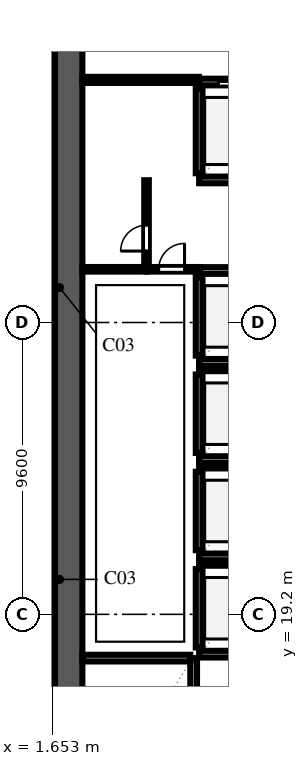
"""IFC4 building model, lengths in metres.
Left out: names, types, materials, properties, quantities, classifications, styles, units other than length and angle.
Written with IfcOpenShell. Run it as: python <this file> out.ifc"""

import sys

from ifc_helpers import new_model, si_unit, direction, frame, frame_2d, origin, place, context, subcontext, project, spatial, rectangle, extrude, element, fill, save


model = new_model("IFC4")
c1 = context("Model", 3, precision=1e-05, world=origin(), true_north=direction((0.0, 1.0)))
c2 = subcontext(c1, "Body", "Model", "MODEL_VIEW")
j1 = project(units=[si_unit("LENGTHUNIT", "METRE"), si_unit("PLANEANGLEUNIT", "RADIAN")], contexts=[c1])
p1 = place(None, origin())
s1 = spatial("IfcSite", under=j1, at=p1, CompositionType="ELEMENT")
p2 = place(p1, origin())
s2 = spatial("IfcBuilding", under=s1, at=p2, CompositionType="ELEMENT")
p3 = place(p2, frame((0.0, 0.0, 81.2)))
s3 = spatial("IfcBuildingStorey", under=s2, at=p3, CompositionType="ELEMENT", Elevation=81.2)
p4 = place(p3, frame((2.2, 9.15, 0.0), z_axis=(0.0, 0.0, 1.0), x_axis=(0.0, 1.0, 0.0)))
e1 = element("IfcWall", 1, at=p4, inside=s3, PredefinedType="SHEAR", context=c2, shape_type="SweptSolid", body=[
    extrude(rectangle(XDim=39.3, YDim=0.9, at=frame_2d((19.65, 0.0))), origin(), (0.0, 0.0, 1.0), 3.54),
])
p5 = place(p3, frame((6.31, 9.95, 0.0), z_axis=(0.0, 0.0, 1.0), x_axis=(0.0, 1.0, 0.0)))
e2 = element("IfcWall", 2, at=p5, inside=s3, PredefinedType="SOLIDWALL", context=c2, shape_type="SweptSolid", body=[
    extrude(rectangle(XDim=7.81, YDim=0.22, at=frame_2d((3.905, 0.0))), origin(), (0.0, 0.0, 1.0), 3.54),
])
p6 = place(p5, frame((0.14, 0.0, 0.0)))
e3 = element("IfcOpeningElement", 3, at=p6, cuts=e2, PredefinedType="OPENING", context=c2, shape_type="SweptSolid", body=[
    extrude(rectangle(XDim=1.1, YDim=2.2, at=frame_2d((0.55, 1.1))), frame((0.0, 0.122, 0.0), z_axis=(0.0, -1.0, 0.0), x_axis=(1.0, 0.0, 0.0)), (0.0, 0.0, 1.0), 0.244),
])
p7 = place(p3, frame((2.65, 17.76, 0.0), z_axis=(0.0, 0.0, 1.0), x_axis=(1.0, 0.0, 0.0)))
e4 = element("IfcWall", 4, at=p7, inside=s3, PredefinedType="SOLIDWALL", context=c2, shape_type="SweptSolid", body=[
    extrude(rectangle(XDim=3.55, YDim=0.22, at=frame_2d((1.775, 0.0))), origin(), (0.0, 0.0, 1.0), 3.54),
])
p8 = place(p3, frame((6.49, 18.11, 0.0), z_axis=(0.0, 0.0, 1.0), x_axis=(0.0, 1.0, 0.0)))
e5 = element("IfcWall", 5, at=p8, inside=s3, PredefinedType="SOLIDWALL", context=c2, shape_type="SweptSolid", body=[
    extrude(rectangle(XDim=2.58, YDim=0.22, at=frame_2d((1.29, 0.0))), origin(), (0.0, 0.0, 1.0), 3.54),
])
for number, where, z_axis, x_axis in (
    (6, (6.49, 17.89, 0.0), (0.0, 0.0, 1.0), (1.0, 0.0, 0.0)),
    (7, (6.49, 20.91, 0.0), (0.0, 0.0, 1.0), (1.0, 0.0, 0.0)),
):
    element("IfcWall", number, at=place(p3, frame(where, z_axis=z_axis, x_axis=x_axis)), inside=s3, PredefinedType="SOLIDWALL", context=c2, shape_type="SweptSolid", body=[
        extrude(rectangle(XDim=2.47, YDim=0.22, at=frame_2d((1.235, 0.0))), origin(), (0.0, 0.0, 1.0), 3.54),
    ])
p9 = place(p3, frame((6.49, 21.31, 0.0), z_axis=(0.0, 0.0, 1.0), x_axis=(0.0, 1.0, 0.0)))
e8 = element("IfcWall", 8, at=p9, inside=s3, PredefinedType="SOLIDWALL", context=c2, shape_type="SweptSolid", body=[
    extrude(rectangle(XDim=2.58, YDim=0.22, at=frame_2d((1.29, 0.0))), origin(), (0.0, 0.0, 1.0), 3.54),
])
for number, where, z_axis, x_axis in (
    (9, (6.49, 21.09, 0.0), (0.0, 0.0, 1.0), (1.0, 0.0, 0.0)),
    (10, (6.49, 24.11, 0.0), (0.0, 0.0, 1.0), (1.0, 0.0, 0.0)),
):
    element("IfcWall", number, at=place(p3, frame(where, z_axis=z_axis, x_axis=x_axis)), inside=s3, PredefinedType="SOLIDWALL", context=c2, shape_type="SweptSolid", body=[
        extrude(rectangle(XDim=2.47, YDim=0.22, at=frame_2d((1.235, 0.0))), origin(), (0.0, 0.0, 1.0), 3.54),
    ])
p10 = place(p3, frame((6.49, 24.51, 0.0), z_axis=(0.0, 0.0, 1.0), x_axis=(0.0, 1.0, 0.0)))
e11 = element("IfcWall", 11, at=p10, inside=s3, PredefinedType="SOLIDWALL", context=c2, shape_type="SweptSolid", body=[
    extrude(rectangle(XDim=2.58, YDim=0.22, at=frame_2d((1.29, 0.0))), origin(), (0.0, 0.0, 1.0), 3.54),
])
for number, where, z_axis, x_axis in (
    (12, (6.49, 24.29, 0.0), (0.0, 0.0, 1.0), (1.0, 0.0, 0.0)),
    (13, (6.49, 27.31, 0.0), (0.0, 0.0, 1.0), (1.0, 0.0, 0.0)),
):
    element("IfcWall", number, at=place(p3, frame(where, z_axis=z_axis, x_axis=x_axis)), inside=s3, PredefinedType="SOLIDWALL", context=c2, shape_type="SweptSolid", body=[
        extrude(rectangle(XDim=2.47, YDim=0.22, at=frame_2d((1.235, 0.0))), origin(), (0.0, 0.0, 1.0), 3.54),
    ])
p11 = place(p3, frame((6.49, 27.71, 0.0), z_axis=(0.0, 0.0, 1.0), x_axis=(0.0, 1.0, 0.0)))
e14 = element("IfcWall", 14, at=p11, inside=s3, PredefinedType="SOLIDWALL", context=c2, shape_type="SweptSolid", body=[
    extrude(rectangle(XDim=2.58, YDim=0.22, at=frame_2d((1.29, 0.0))), origin(), (0.0, 0.0, 1.0), 3.54),
])
for number, where, z_axis, x_axis in (
    (15, (6.49, 27.49, 0.0), (0.0, 0.0, 1.0), (1.0, 0.0, 0.0)),
    (16, (6.49, 30.51, 0.0), (0.0, 0.0, 1.0), (1.0, 0.0, 0.0)),
):
    element("IfcWall", number, at=place(p3, frame(where, z_axis=z_axis, x_axis=x_axis)), inside=s3, PredefinedType="SOLIDWALL", context=c2, shape_type="SweptSolid", body=[
        extrude(rectangle(XDim=2.47, YDim=0.22, at=frame_2d((1.235, 0.0))), origin(), (0.0, 0.0, 1.0), 3.54),
    ])
p12 = place(p3, frame((6.49, 33.71, 0.0), z_axis=(0.0, 0.0, 1.0), x_axis=(0.0, 1.0, 0.0)))
e17 = element("IfcWall", 17, at=p12, inside=s3, PredefinedType="SOLIDWALL", context=c2, shape_type="SweptSolid", body=[
    extrude(rectangle(XDim=2.78, YDim=0.22, at=frame_2d((1.39, 0.0))), origin(), (0.0, 0.0, 1.0), 3.54),
])
p13 = place(p3, frame((6.49, 33.49, 0.0), z_axis=(0.0, 0.0, 1.0), x_axis=(1.0, 0.0, 0.0)))
e18 = element("IfcWall", 18, at=p13, inside=s3, PredefinedType="SOLIDWALL", context=c2, shape_type="SweptSolid", body=[
    extrude(rectangle(XDim=2.47, YDim=0.22, at=frame_2d((1.235, 0.0))), origin(), (0.0, 0.0, 1.0), 3.54),
])
p14 = place(p3, frame((6.49, 36.71, 0.0), z_axis=(0.0, 0.0, 1.0), x_axis=(1.0, 0.0, 0.0)))
e19 = element("IfcWall", 19, at=p14, inside=s3, PredefinedType="SOLIDWALL", context=c2, shape_type="SweptSolid", body=[
    extrude(rectangle(XDim=2.47, YDim=0.22, at=frame_2d((1.235, 0.0))), origin(), (0.0, 0.0, 1.0), 3.54),
])
p15 = place(p14, frame((0.635, 0.0, 0.0)))
e20 = element("IfcOpeningElement", 20, at=p15, cuts=e19, PredefinedType="OPENING", context=c2, shape_type="SweptSolid", body=[
    extrude(rectangle(XDim=1.2, YDim=2.2, at=frame_2d((0.6, 1.1))), frame((0.0, 0.122, 0.0), z_axis=(0.0, -1.0, 0.0), x_axis=(1.0, 0.0, 0.0)), (0.0, 0.0, 1.0), 0.244),
])
p16 = place(p3, frame((2.65, 36.78, 0.0), z_axis=(0.0, 0.0, 1.0), x_axis=(1.0, 0.0, 0.0)))
e21 = element("IfcWall", 21, at=p16, inside=s3, PredefinedType="SOLIDWALL", context=c2, shape_type="SweptSolid", body=[
    extrude(rectangle(XDim=3.83, YDim=0.2, at=frame_2d((1.915, 0.0))), origin(), (0.0, 0.0, 1.0), 3.54),
])
p17 = place(p3, frame((4.76, 30.55, 0.0), z_axis=(0.0, 0.0, 1.0), x_axis=(0.0, 1.0, 0.0)))
e22 = element("IfcWall", 22, at=p17, inside=s3, PredefinedType="PARTITIONING", context=c2, shape_type="SweptSolid", body=[
    extrude(rectangle(XDim=2.93, YDim=0.15, at=frame_2d((1.465, 0.0))), origin(), (0.0, 0.0, 1.0), 3.54),
])
p18 = place(p17, frame((0.6, 0.0, 0.0)))
e23 = element("IfcOpeningElement", 23, at=p18, cuts=e22, PredefinedType="OPENING", context=c2, shape_type="SweptSolid", body=[
    extrude(rectangle(XDim=0.85, YDim=2.1, at=frame_2d((0.425, 1.05))), frame((0.0, 0.087, 0.0), z_axis=(0.0, -1.0, 0.0), x_axis=(1.0, 0.0, 0.0)), (0.0, 0.0, 1.0), 0.174),
])
p19 = place(p3, frame((4.76, 30.55, 0.0), z_axis=(0.0, 0.0, 1.0), x_axis=(1.0, 0.0, 0.0)))
e24 = element("IfcWall", 24, at=p19, inside=s3, PredefinedType="PARTITIONING", context=c2, shape_type="SweptSolid", body=[
    extrude(rectangle(XDim=1.76, YDim=0.15, at=frame_2d((0.88, 0.0))), origin(), (0.0, 0.0, 1.0), 3.54),
])
p20 = place(p19, frame((0.4, 0.0, 0.0)))
e25 = element("IfcOpeningElement", 25, at=p20, cuts=e24, PredefinedType="OPENING", context=c2, shape_type="SweptSolid", body=[
    extrude(rectangle(XDim=0.85, YDim=2.1, at=frame_2d((0.425, 1.05))), frame((0.0, 0.087, 0.0), z_axis=(0.0, -1.0, 0.0), x_axis=(1.0, 0.0, 0.0)), (0.0, 0.0, 1.0), 0.174),
])
p21 = place(p3, frame((2.65, 30.55, 0.0), z_axis=(0.0, 0.0, 1.0), x_axis=(1.0, 0.0, 0.0)))
e26 = element("IfcWall", 26, at=p21, inside=s3, PredefinedType="PARTITIONING", context=c2, shape_type="SweptSolid", body=[
    extrude(rectangle(XDim=2.11, YDim=0.15, at=frame_2d((1.055, 0.0))), origin(), (0.0, 0.0, 1.0), 3.54),
])
p22 = place(p15, origin())
e27 = element("IfcDoor", 27, at=p22, inside=s3, OperationType="DOUBLE_DOOR_SLIDING", PredefinedType="DOOR", context=c2, shape_type="SweptSolid", body=[
    extrude(rectangle(XDim=1.2, YDim=2.2, at=frame_2d((0.6, 1.1))), frame((0.0, 0.025, 0.0), z_axis=(0.0, -1.0, 0.0), x_axis=(1.0, 0.0, 0.0)), (0.0, 0.0, 1.0), 0.05),
])
fill(e20, e27)
p23 = place(p18, origin())
e28 = element("IfcDoor", 28, at=p23, inside=s3, OperationType="SINGLE_SWING_LEFT", PredefinedType="DOOR", context=c2, shape_type="SweptSolid", body=[
    extrude(rectangle(XDim=0.85, YDim=2.1, at=frame_2d((0.425, 1.05))), frame((0.0, 0.025, 0.0), z_axis=(0.0, -1.0, 0.0), x_axis=(1.0, 0.0, 0.0)), (0.0, 0.0, 1.0), 0.05),
])
fill(e23, e28)
p24 = place(p20, origin())
e29 = element("IfcDoor", 29, at=p24, inside=s3, OperationType="SINGLE_SWING_RIGHT", PredefinedType="DOOR", context=c2, shape_type="SweptSolid", body=[
    extrude(rectangle(XDim=0.85, YDim=2.1, at=frame_2d((0.425, 1.05))), frame((0.0, 0.025, 0.0), z_axis=(0.0, -1.0, 0.0), x_axis=(1.0, 0.0, 0.0)), (0.0, 0.0, 1.0), 0.05),
])
fill(e25, e29)
save(model, sys.argv[1])
